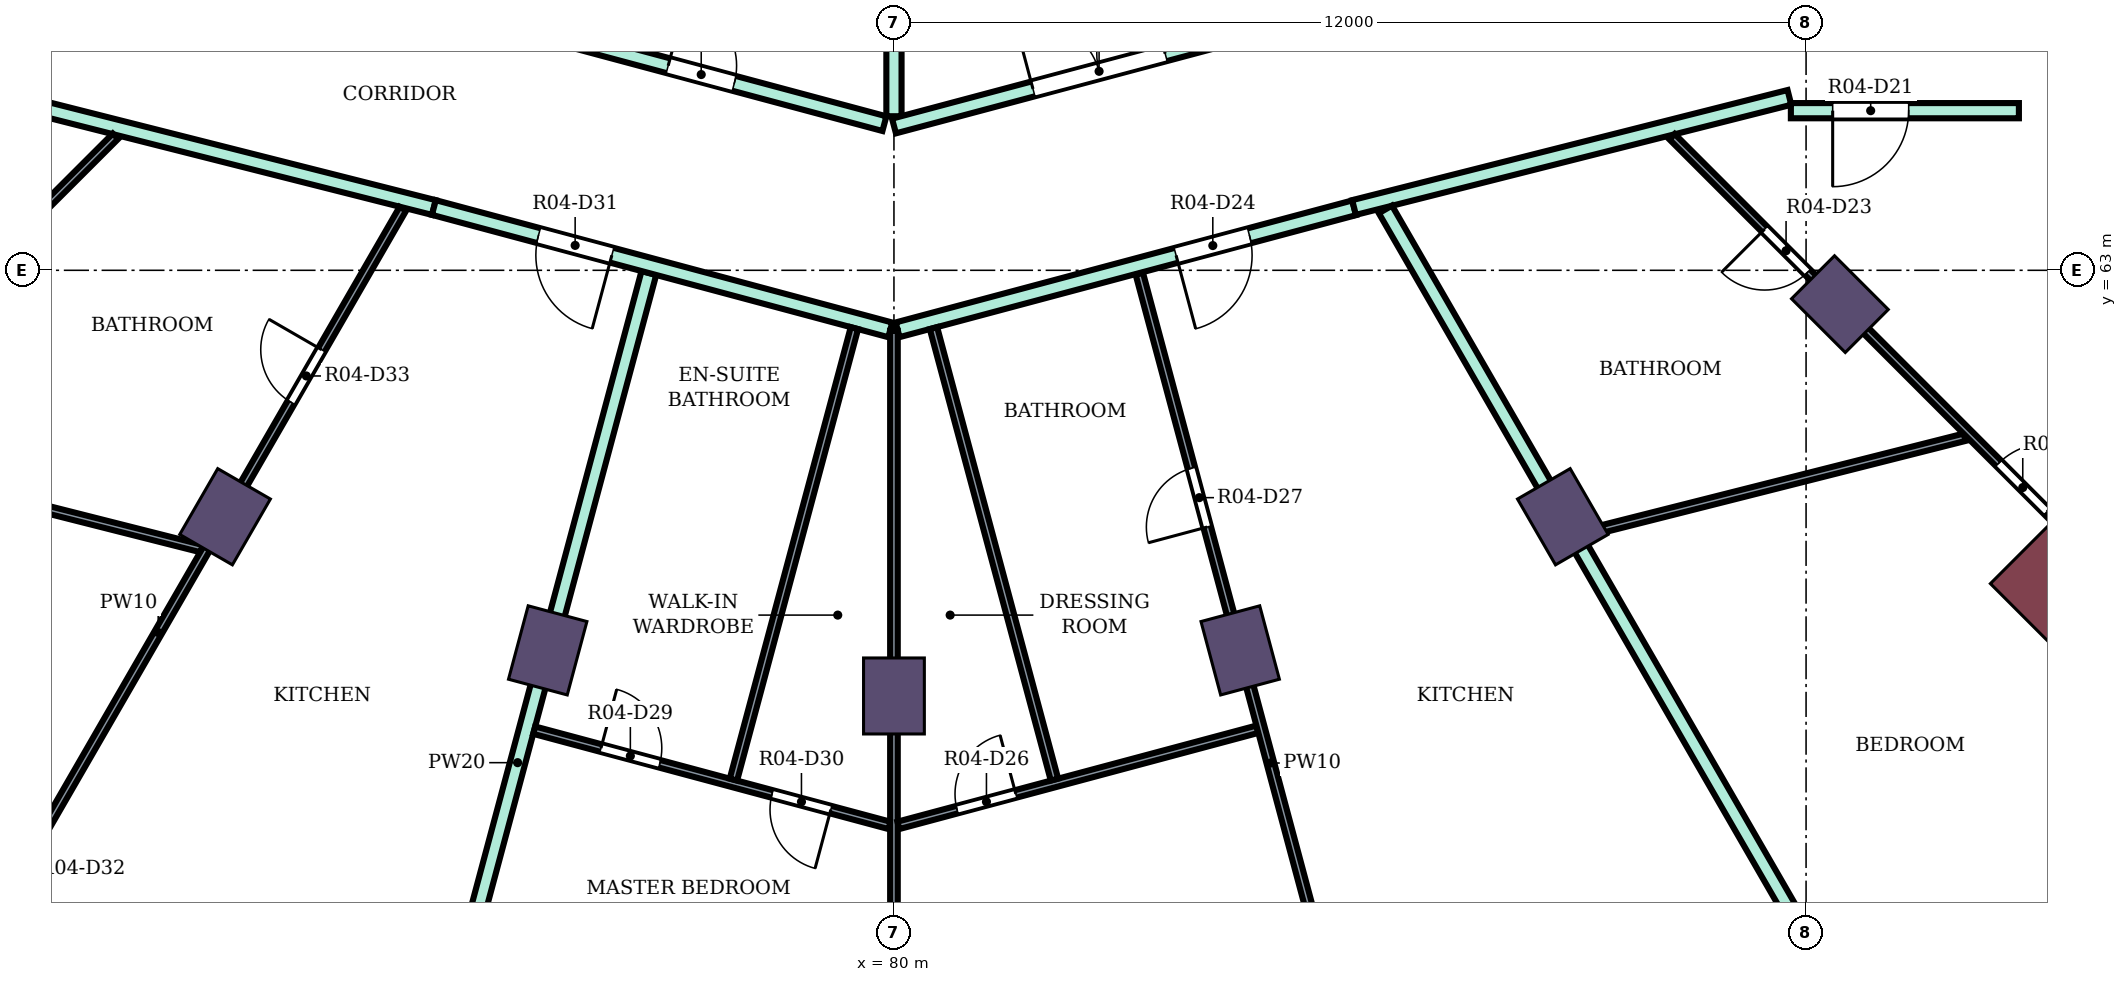
"""IFC4 building model, lengths in metres.
Left out: names, types, materials, properties, quantities, classifications, styles, units other than length and angle.
Written with IfcOpenShell. Run it as: python <this file> out.ifc"""

import sys

from ifc_helpers import new_model, si_unit, direction, frame, frame_2d, origin, origin_2d, place, context, subcontext, project, spatial, rectangle, extrude, element, fill, save


model = new_model("IFC4")
c1 = context("Model", 3, precision=1e-05, world=origin(), true_north=direction((0.0, 1.0)))
c2 = subcontext(c1, "Body", "Model", "MODEL_VIEW")
j1 = project(units=[si_unit("LENGTHUNIT", "METRE"), si_unit("PLANEANGLEUNIT", "RADIAN")], contexts=[c1])
p1 = place(None, origin())
s1 = spatial("IfcSite", under=j1, at=p1, CompositionType="ELEMENT")
p2 = place(p1, origin())
s2 = spatial("IfcBuilding", under=s1, at=p2, CompositionType="ELEMENT")
p3 = place(p2, frame((0.0, 0.0, 202.8)))
s3 = spatial("IfcBuildingStorey", under=s2, at=p3, CompositionType="ELEMENT", Elevation=202.8)
for number, where, z_axis, x_axis in (
    (1, (71.2, 59.758, 0.0), (0.0, 0.0, 1.0), (-0.5, -0.866, 0.0)),
    (2, (75.445, 58.0, 0.0), (0.0, 0.0, 1.0), (-0.259, -0.966, 0.0)),
    (3, (80.0, 57.4, 0.0), (0.0, 0.0, 1.0), (0.0, -1.0, 0.0)),
    (4, (84.555, 58.0, 0.0), (0.0, 0.0, 1.0), (0.259, -0.966, 0.0)),
    (5, (88.8, 59.758, 0.0), (0.0, 0.0, 1.0), (0.5, -0.866, 0.0)),
    (6, (92.445, 62.555, 0.0), (0.0, 0.0, 1.0), (0.707, -0.707, 0.0)),
):
    element("IfcColumn", number, at=place(p3, frame(where, z_axis=z_axis, x_axis=x_axis)), inside=s3, PredefinedType="COLUMN", context=c2, shape_type="SweptSolid", body=[
        extrude(rectangle(XDim=1.0, YDim=0.8, at=origin_2d()), origin(), (0.0, 0.0, 1.0), 4.1),
    ])
p4 = place(p3, frame((95.91, 59.09, 0.0), z_axis=(0.0, 0.0, 1.0), x_axis=(0.707106781187, -0.707106781187, 0.0)))
e7 = element("IfcColumn", 7, at=p4, inside=s3, PredefinedType="COLUMN", context=c2, shape_type="SweptSolid", body=[
    extrude(rectangle(XDim=1.8, YDim=2.4, at=origin_2d()), origin(), (0.0, 0.0, 1.0), 4.1),
])
p5 = place(p3, frame((68.2, 65.28, 0.0), z_axis=(0.0, 0.0, 1.0), x_axis=(0.969450596516, -0.245286650503, 0.0)))
e8 = element("IfcWall", 8, at=p5, inside=s3, PredefinedType="PARTITIONING", context=c2, shape_type="SweptSolid", body=[
    extrude(rectangle(XDim=5.928, YDim=0.2, at=frame_2d((2.964, 0.0))), origin(), (0.0, 0.0, 1.0), 3.65),
])
p6 = place(p3, frame((73.323, 50.081, 0.0), z_axis=(0.0, 0.0, 1.0), x_axis=(0.258888262922, 0.965907276772, 0.0)))
e9 = element("IfcWall", 9, at=p6, inside=s3, PredefinedType="PARTITIONING", context=c2, shape_type="SweptSolid", body=[
    extrude(rectangle(XDim=13.338, YDim=0.2, at=frame_2d((6.669, 0.0))), origin(), (0.0, 0.0, 1.0), 3.65),
])
p7 = place(p3, frame((73.947, 63.826, 0.0), z_axis=(0.0, 0.0, 1.0), x_axis=(0.965908253407, -0.258884619088, 0.0)))
e10 = element("IfcWall", 10, at=p7, inside=s3, PredefinedType="PARTITIONING", context=c2, shape_type="SweptSolid", body=[
    extrude(rectangle(XDim=6.217, YDim=0.2, at=frame_2d((3.108, 0.0))), origin(), (0.0, 0.0, 1.0), 3.65),
])
p8 = place(p7, frame((1.424, 0.0, 0.0)))
e11 = element("IfcOpeningElement", 11, at=p8, cuts=e10, PredefinedType="OPENING", context=c2, shape_type="SweptSolid", body=[
    extrude(rectangle(XDim=1.0, YDim=2.1, at=frame_2d((0.5, 1.05))), frame((0.0, 0.11, 0.0), z_axis=(0.0, -1.0, 0.0), x_axis=(1.0, 0.0, 0.0)), (0.0, 0.0, 1.0), 0.22),
])
p9 = place(p3, frame((74.603, 66.342, 0.0), z_axis=(0.0, 0.0, 1.0), x_axis=(0.965920893652, -0.258837453254, 0.0)))
e12 = element("IfcWall", 12, at=p9, inside=s3, PredefinedType="PARTITIONING", context=c2, shape_type="SweptSolid", body=[
    extrude(rectangle(XDim=5.458, YDim=0.2, at=frame_2d((2.729, 0.0))), origin(), (0.0, 0.0, 1.0), 3.65),
])
p10 = place(p9, frame((2.512, 0.0, 0.0)))
e13 = element("IfcOpeningElement", 13, at=p10, cuts=e12, PredefinedType="OPENING", context=c2, shape_type="SweptSolid", body=[
    extrude(rectangle(XDim=0.9, YDim=2.1, at=frame_2d((0.45, 1.05))), frame((0.0, 0.11, 0.0), z_axis=(0.0, -1.0, 0.0), x_axis=(1.0, 0.0, 0.0)), (0.0, 0.0, 1.0), 0.22),
])
p11 = place(p3, frame((80.048, 62.217, 0.0), z_axis=(0.0, 0.0, 1.0), x_axis=(0.966097920642, 0.258175923996, 0.0)))
e14 = element("IfcWall", 14, at=p11, inside=s3, PredefinedType="PARTITIONING", context=c2, shape_type="SweptSolid", body=[
    extrude(rectangle(XDim=6.217, YDim=0.2, at=frame_2d((3.108, 0.0))), origin(), (0.0, 0.0, 1.0), 3.65),
])
p12 = place(p11, frame((3.792, 0.0, 0.0)))
e15 = element("IfcOpeningElement", 15, at=p12, cuts=e14, PredefinedType="OPENING", context=c2, shape_type="SweptSolid", body=[
    extrude(rectangle(XDim=1.0, YDim=2.1, at=frame_2d((0.5, 1.05))), frame((0.0, 0.11, 0.0), z_axis=(0.0, -1.0, 0.0), x_axis=(1.0, 0.0, 0.0)), (0.0, 0.0, 1.0), 0.22),
])
p13 = place(p3, frame((80.0, 65.027, 0.0), z_axis=(0.0, 0.0, 1.0), x_axis=(0.0, 1.0, 0.0)))
e16 = element("IfcWall", 16, at=p13, inside=s3, PredefinedType="PARTITIONING", context=c2, shape_type="SweptSolid", body=[
    extrude(rectangle(XDim=2.273, YDim=0.2, at=frame_2d((1.136, 0.0))), origin(), (0.0, 0.0, 1.0), 3.65),
])
p14 = place(p3, frame((80.0, 64.898, 0.0), z_axis=(0.0, 0.0, 1.0), x_axis=(0.966236923997, 0.25765520896, 0.0)))
e17 = element("IfcWall", 17, at=p14, inside=s3, PredefinedType="PARTITIONING", context=c2, shape_type="SweptSolid", body=[
    extrude(rectangle(XDim=8.168, YDim=0.2, at=frame_2d((4.084, 0.0))), origin(), (0.0, 0.0, 1.0), 3.65),
])
p15 = place(p14, frame((1.893, 0.0, 0.0)))
e18 = element("IfcOpeningElement", 18, at=p15, cuts=e17, PredefinedType="OPENING", context=c2, shape_type="SweptSolid", body=[
    extrude(rectangle(XDim=1.8, YDim=2.1, at=frame_2d((0.9, 1.05))), frame((0.0, 0.11, 0.0), z_axis=(0.0, -1.0, 0.0), x_axis=(1.0, 0.0, 0.0)), (0.0, 0.0, 1.0), 0.22),
])
p16 = place(p3, frame((86.053, 63.826, 0.0), z_axis=(0.0, 0.0, 1.0), x_axis=(0.969490004987, 0.245130843083, 0.0)))
e19 = element("IfcWall", 19, at=p16, inside=s3, PredefinedType="PARTITIONING", context=c2, shape_type="SweptSolid", body=[
    extrude(rectangle(XDim=5.908, YDim=0.2, at=frame_2d((2.954, 0.0))), origin(), (0.0, 0.0, 1.0), 3.65),
])
p17 = place(p3, frame((86.466, 63.801, 0.0), z_axis=(0.0, 0.0, 1.0), x_axis=(0.499937082171, -0.866061726362, 0.0)))
e20 = element("IfcWall", 20, at=p17, inside=s3, PredefinedType="PARTITIONING", context=c2, shape_type="SweptSolid", body=[
    extrude(rectangle(XDim=12.866, YDim=0.2, at=frame_2d((6.433, 0.0))), origin(), (0.0, 0.0, 1.0), 3.65),
])
p18 = place(p3, frame((91.8, 65.1, 0.0), z_axis=(0.0, 0.0, 1.0), x_axis=(1.0, 0.0, 0.0)))
e21 = element("IfcWall", 21, at=p18, inside=s3, PredefinedType="PARTITIONING", context=c2, shape_type="SweptSolid", body=[
    extrude(rectangle(XDim=3.0, YDim=0.2, at=frame_2d((1.5, 0.0))), origin(), (0.0, 0.0, 1.0), 3.65),
])
p19 = place(p18, frame((0.55, 0.0, 0.0)))
e22 = element("IfcOpeningElement", 22, at=p19, cuts=e21, PredefinedType="OPENING", context=c2, shape_type="SweptSolid", body=[
    extrude(rectangle(XDim=1.0, YDim=2.1, at=frame_2d((0.5, 1.05))), frame((0.0, 0.11, 0.0), z_axis=(0.0, -1.0, 0.0), x_axis=(1.0, 0.0, 0.0)), (0.0, 0.0, 1.0), 0.22),
])
p20 = place(p3, frame((63.592, 58.6, 0.0), z_axis=(0.0, 0.0, 1.0), x_axis=(0.707260766325, 0.706952762508, 0.0)))
e23 = element("IfcWall", 23, at=p20, inside=s3, PredefinedType="PARTITIONING", context=c2, shape_type="SweptSolid", body=[
    extrude(rectangle(XDim=8.719, YDim=0.1, at=frame_2d((4.36, 0.0))), origin(), (0.0, 0.0, 1.0), 3.65),
])
p21 = place(p20, frame((1.772, 0.0, 0.0)))
e24 = element("IfcOpeningElement", 24, at=p21, cuts=e23, PredefinedType="OPENING", context=c2, shape_type="SweptSolid", body=[
    extrude(rectangle(XDim=0.9, YDim=2.1, at=frame_2d((0.45, 1.05))), frame((0.0, 0.06, 0.0), z_axis=(0.0, -1.0, 0.0), x_axis=(1.0, 0.0, 0.0)), (0.0, 0.0, 1.0), 0.12),
])
p22 = place(p3, frame((65.74, 60.642, 0.0), z_axis=(0.0, 0.0, 1.0), x_axis=(0.969435742918, -0.245345349156, 0.0)))
e25 = element("IfcWall", 25, at=p22, inside=s3, PredefinedType="PARTITIONING", context=c2, shape_type="SweptSolid", body=[
    extrude(rectangle(XDim=5.314, YDim=0.1, at=frame_2d((2.657, 0.0))), origin(), (0.0, 0.0, 1.0), 3.65),
])
p23 = place(p3, frame((67.101, 52.659, 0.0), z_axis=(0.0, 0.0, 1.0), x_axis=(0.500035926033, 0.866004660886, 0.0)))
e26 = element("IfcWall", 26, at=p23, inside=s3, PredefinedType="PARTITIONING", context=c2, shape_type="SweptSolid", body=[
    extrude(rectangle(XDim=12.876, YDim=0.1, at=frame_2d((6.438, 0.0))), origin(), (0.0, 0.0, 1.0), 3.65),
])
p24 = place(p23, frame((2.401, 0.0, 0.0)))
e27 = element("IfcOpeningElement", 27, at=p24, cuts=e26, PredefinedType="OPENING", context=c2, shape_type="SweptSolid", body=[
    extrude(rectangle(XDim=0.9, YDim=2.1, at=frame_2d((0.45, 1.05))), frame((0.0, 0.06, 0.0), z_axis=(0.0, -1.0, 0.0), x_axis=(1.0, 0.0, 0.0)), (0.0, 0.0, 1.0), 0.12),
])
p25 = place(p23, frame((9.936, 0.0, 0.0)))
e28 = element("IfcOpeningElement", 28, at=p25, cuts=e26, PredefinedType="OPENING", context=c2, shape_type="SweptSolid", body=[
    extrude(rectangle(XDim=0.8, YDim=2.1, at=frame_2d((0.4, 1.05))), frame((0.0, 0.06, 0.0), z_axis=(0.0, -1.0, 0.0), x_axis=(1.0, 0.0, 0.0)), (0.0, 0.0, 1.0), 0.12),
])
p26 = place(p3, frame((75.267, 56.95, 0.0), z_axis=(0.0, 0.0, 1.0), x_axis=(0.965900084933, -0.25891509405, 0.0)))
e29 = element("IfcWall", 29, at=p26, inside=s3, PredefinedType="PARTITIONING", context=c2, shape_type="SweptSolid", body=[
    extrude(rectangle(XDim=4.84, YDim=0.1, at=frame_2d((2.42, 0.0))), origin(), (0.0, 0.0, 1.0), 3.65),
])
p27 = place(p26, frame((0.91, 0.0, 0.0)))
e30 = element("IfcOpeningElement", 30, at=p27, cuts=e29, PredefinedType="OPENING", context=c2, shape_type="SweptSolid", body=[
    extrude(rectangle(XDim=0.8, YDim=2.1, at=frame_2d((0.4, 1.05))), frame((0.0, 0.06, 0.0), z_axis=(0.0, -1.0, 0.0), x_axis=(1.0, 0.0, 0.0)), (0.0, 0.0, 1.0), 0.12),
])
p28 = place(p26, frame((3.24, 0.0, 0.0)))
e31 = element("IfcOpeningElement", 31, at=p28, cuts=e29, PredefinedType="OPENING", context=c2, shape_type="SweptSolid", body=[
    extrude(rectangle(XDim=0.8, YDim=2.1, at=frame_2d((0.4, 1.05))), frame((0.0, 0.06, 0.0), z_axis=(0.0, -1.0, 0.0), x_axis=(1.0, 0.0, 0.0)), (0.0, 0.0, 1.0), 0.12),
])
p29 = place(p3, frame((77.888, 56.3, 0.0), z_axis=(0.0, 0.0, 1.0), x_axis=(0.258885575383, 0.965907997098, 0.0)))
e32 = element("IfcWall", 32, at=p29, inside=s3, PredefinedType="PARTITIONING", context=c2, shape_type="SweptSolid", body=[
    extrude(rectangle(XDim=6.15, YDim=0.1, at=frame_2d((3.075, 0.0))), origin(), (0.0, 0.0, 1.0), 3.65),
])
p30 = place(p3, frame((80.0, 51.8, 0.0), z_axis=(0.0, 0.0, 1.0), x_axis=(0.0, 1.0, 0.0)))
e33 = element("IfcWall", 33, at=p30, inside=s3, PredefinedType="PARTITIONING", context=c2, shape_type="SweptSolid", body=[
    extrude(rectangle(XDim=10.404, YDim=0.1, at=frame_2d((5.202, 0.0))), origin(), (0.0, 0.0, 1.0), 3.65),
])
p31 = place(p30, frame((1.666, 0.0, 0.0)))
e34 = element("IfcOpeningElement", 34, at=p31, cuts=e33, PredefinedType="OPENING", context=c2, shape_type="SweptSolid", body=[
    extrude(rectangle(XDim=0.9, YDim=2.1, at=frame_2d((0.45, 1.05))), frame((0.0, 0.06, 0.0), z_axis=(0.0, -1.0, 0.0), x_axis=(1.0, 0.0, 0.0)), (0.0, 0.0, 1.0), 0.12),
])
p32 = place(p3, frame((80.058, 55.698, 0.0), z_axis=(0.0, 0.0, 1.0), x_axis=(0.965970105839, 0.258653734992, 0.0)))
e35 = element("IfcWall", 35, at=p32, inside=s3, PredefinedType="PARTITIONING", context=c2, shape_type="SweptSolid", body=[
    extrude(rectangle(XDim=4.89, YDim=0.1, at=frame_2d((2.445, 0.0))), origin(), (0.0, 0.0, 1.0), 3.65),
])
p33 = place(p32, frame((0.8, 0.0, 0.0)))
e36 = element("IfcOpeningElement", 36, at=p33, cuts=e35, PredefinedType="OPENING", context=c2, shape_type="SweptSolid", body=[
    extrude(rectangle(XDim=0.8, YDim=2.1, at=frame_2d((0.4, 1.05))), frame((0.0, 0.06, 0.0), z_axis=(0.0, -1.0, 0.0), x_axis=(1.0, 0.0, 0.0)), (0.0, 0.0, 1.0), 0.12),
])
p34 = place(p3, frame((80.52, 62.24, 0.0), z_axis=(0.0, 0.0, 1.0), x_axis=(0.258885575383, -0.965907997098, 0.0)))
e37 = element("IfcWall", 37, at=p34, inside=s3, PredefinedType="PARTITIONING", context=c2, shape_type="SweptSolid", body=[
    extrude(rectangle(XDim=6.15, YDim=0.1, at=frame_2d((3.075, 0.0))), origin(), (0.0, 0.0, 1.0), 3.65),
])
p35 = place(p3, frame((83.228, 62.955, 0.0), z_axis=(0.0, 0.0, 1.0), x_axis=(0.258737611245, -0.965947642746, 0.0)))
e38 = element("IfcWall", 38, at=p35, inside=s3, PredefinedType="PARTITIONING", context=c2, shape_type="SweptSolid", body=[
    extrude(rectangle(XDim=13.328, YDim=0.1, at=frame_2d((6.664, 0.0))), origin(), (0.0, 0.0, 1.0), 3.65),
])
p36 = place(p35, frame((9.684, 0.0, 0.0)))
e39 = element("IfcOpeningElement", 39, at=p36, cuts=e38, PredefinedType="OPENING", context=c2, shape_type="SweptSolid", body=[
    extrude(rectangle(XDim=0.9, YDim=2.1, at=frame_2d((0.45, 1.05))), frame((0.0, 0.06, 0.0), z_axis=(0.0, -1.0, 0.0), x_axis=(1.0, 0.0, 0.0)), (0.0, 0.0, 1.0), 0.12),
])
p37 = place(p35, frame((2.65, 0.0, 0.0)))
e40 = element("IfcOpeningElement", 40, at=p37, cuts=e38, PredefinedType="OPENING", context=c2, shape_type="SweptSolid", body=[
    extrude(rectangle(XDim=0.8, YDim=2.1, at=frame_2d((0.4, 1.05))), frame((0.0, 0.06, 0.0), z_axis=(0.0, -1.0, 0.0), x_axis=(1.0, 0.0, 0.0)), (0.0, 0.0, 1.0), 0.12),
])
p38 = place(p3, frame((89.054, 59.531, 0.0), z_axis=(0.0, 0.0, 1.0), x_axis=(0.969472150829, 0.245201445279, 0.0)))
e41 = element("IfcWall", 41, at=p38, inside=s3, PredefinedType="PARTITIONING", context=c2, shape_type="SweptSolid", body=[
    extrude(rectangle(XDim=5.191, YDim=0.1, at=frame_2d((2.596, 0.0))), origin(), (0.0, 0.0, 1.0), 3.65),
])
p39 = place(p3, frame((90.236, 64.758, 0.0), z_axis=(0.0, 0.0, 1.0), x_axis=(0.706952774706, -0.707260754132, 0.0)))
e42 = element("IfcWall", 42, at=p39, inside=s3, PredefinedType="PARTITIONING", context=c2, shape_type="SweptSolid", body=[
    extrude(rectangle(XDim=8.72, YDim=0.1, at=frame_2d((4.36, 0.0))), origin(), (0.0, 0.0, 1.0), 3.65),
])
p40 = place(p39, frame((6.077, 0.0, 0.0)))
e43 = element("IfcOpeningElement", 43, at=p40, cuts=e42, PredefinedType="OPENING", context=c2, shape_type="SweptSolid", body=[
    extrude(rectangle(XDim=0.9, YDim=2.1, at=frame_2d((0.45, 1.05))), frame((0.0, 0.06, 0.0), z_axis=(0.0, -1.0, 0.0), x_axis=(1.0, 0.0, 0.0)), (0.0, 0.0, 1.0), 0.12),
])
p41 = place(p39, frame((1.722, 0.0, 0.0)))
e44 = element("IfcOpeningElement", 44, at=p41, cuts=e42, PredefinedType="OPENING", context=c2, shape_type="SweptSolid", body=[
    extrude(rectangle(XDim=0.8, YDim=2.1, at=frame_2d((0.4, 1.05))), frame((0.0, 0.06, 0.0), z_axis=(0.0, -1.0, 0.0), x_axis=(1.0, 0.0, 0.0)), (0.0, 0.0, 1.0), 0.12),
])
p42 = place(p19, frame((1.0, 0.0, 0.0), z_axis=(0.0, 0.0, 1.0), x_axis=(-1.0, 0.0, 0.0)))
e45 = element("IfcDoor", 45, at=p42, inside=s3, OperationType="SINGLE_SWING_RIGHT", PredefinedType="DOOR", context=c2, shape_type="SweptSolid", body=[
    extrude(rectangle(XDim=1.0, YDim=2.1, at=frame_2d((0.5, 1.05))), frame((0.0, 0.025, 0.0), z_axis=(0.0, -1.0, 0.0), x_axis=(1.0, 0.0, 0.0)), (0.0, 0.0, 1.0), 0.05),
])
fill(e22, e45)
p43 = place(p40, origin())
e46 = element("IfcDoor", 46, at=p43, inside=s3, OperationType="SINGLE_SWING_RIGHT", PredefinedType="DOOR", context=c2, shape_type="SweptSolid", body=[
    extrude(rectangle(XDim=0.9, YDim=2.1, at=frame_2d((0.45, 1.05))), frame((0.0, 0.025, 0.0), z_axis=(0.0, -1.0, 0.0), x_axis=(1.0, 0.0, 0.0)), (0.0, 0.0, 1.0), 0.05),
])
fill(e43, e46)
p44 = place(p41, frame((0.8, 0.0, 0.0), z_axis=(0.0, 0.0, 1.0), x_axis=(-1.0, 0.0, 0.0)))
e47 = element("IfcDoor", 47, at=p44, inside=s3, OperationType="SINGLE_SWING_RIGHT", PredefinedType="DOOR", context=c2, shape_type="SweptSolid", body=[
    extrude(rectangle(XDim=0.8, YDim=2.1, at=frame_2d((0.4, 1.05))), frame((0.0, 0.025, 0.0), z_axis=(0.0, -1.0, 0.0), x_axis=(1.0, 0.0, 0.0)), (0.0, 0.0, 1.0), 0.05),
])
fill(e44, e47)
p45 = place(p12, frame((1.0, 0.0, 0.0), z_axis=(0.0, 0.0, 1.0), x_axis=(-1.0, 0.0, 0.0)))
e48 = element("IfcDoor", 48, at=p45, inside=s3, OperationType="SINGLE_SWING_RIGHT", PredefinedType="DOOR", context=c2, shape_type="SweptSolid", body=[
    extrude(rectangle(XDim=1.0, YDim=2.1, at=frame_2d((0.5, 1.05))), frame((0.0, 0.025, 0.0), z_axis=(0.0, -1.0, 0.0), x_axis=(1.0, 0.0, 0.0)), (0.0, 0.0, 1.0), 0.05),
])
fill(e15, e48)
p46 = place(p33, origin())
e49 = element("IfcDoor", 49, at=p46, inside=s3, OperationType="SINGLE_SWING_RIGHT", PredefinedType="DOOR", context=c2, shape_type="SweptSolid", body=[
    extrude(rectangle(XDim=0.8, YDim=2.1, at=frame_2d((0.4, 1.05))), frame((0.0, 0.025, 0.0), z_axis=(0.0, -1.0, 0.0), x_axis=(1.0, 0.0, 0.0)), (0.0, 0.0, 1.0), 0.05),
])
fill(e36, e49)
p47 = place(p37, frame((0.8, 0.0, 0.0), z_axis=(0.0, 0.0, 1.0), x_axis=(-1.0, 0.0, 0.0)))
e50 = element("IfcDoor", 50, at=p47, inside=s3, OperationType="SINGLE_SWING_LEFT", PredefinedType="DOOR", context=c2, shape_type="SweptSolid", body=[
    extrude(rectangle(XDim=0.8, YDim=2.1, at=frame_2d((0.4, 1.05))), frame((0.0, 0.025, 0.0), z_axis=(0.0, -1.0, 0.0), x_axis=(1.0, 0.0, 0.0)), (0.0, 0.0, 1.0), 0.05),
])
fill(e40, e50)
p48 = place(p27, origin())
e51 = element("IfcDoor", 51, at=p48, inside=s3, OperationType="SINGLE_SWING_LEFT", PredefinedType="DOOR", context=c2, shape_type="SweptSolid", body=[
    extrude(rectangle(XDim=0.8, YDim=2.1, at=frame_2d((0.4, 1.05))), frame((0.0, 0.025, 0.0), z_axis=(0.0, -1.0, 0.0), x_axis=(1.0, 0.0, 0.0)), (0.0, 0.0, 1.0), 0.05),
])
fill(e30, e51)
p49 = place(p28, frame((0.8, 0.0, 0.0), z_axis=(0.0, 0.0, 1.0), x_axis=(-1.0, 0.0, 0.0)))
e52 = element("IfcDoor", 52, at=p49, inside=s3, OperationType="SINGLE_SWING_LEFT", PredefinedType="DOOR", context=c2, shape_type="SweptSolid", body=[
    extrude(rectangle(XDim=0.8, YDim=2.1, at=frame_2d((0.4, 1.05))), frame((0.0, 0.025, 0.0), z_axis=(0.0, -1.0, 0.0), x_axis=(1.0, 0.0, 0.0)), (0.0, 0.0, 1.0), 0.05),
])
fill(e31, e52)
p50 = place(p8, frame((1.0, 0.0, 0.0), z_axis=(0.0, 0.0, 1.0), x_axis=(-1.0, 0.0, 0.0)))
e53 = element("IfcDoor", 53, at=p50, inside=s3, OperationType="SINGLE_SWING_LEFT", PredefinedType="DOOR", context=c2, shape_type="SweptSolid", body=[
    extrude(rectangle(XDim=1.0, YDim=2.1, at=frame_2d((0.5, 1.05))), frame((0.0, 0.025, 0.0), z_axis=(0.0, -1.0, 0.0), x_axis=(1.0, 0.0, 0.0)), (0.0, 0.0, 1.0), 0.05),
])
fill(e11, e53)
p51 = place(p25, origin())
e54 = element("IfcDoor", 54, at=p51, inside=s3, OperationType="SINGLE_SWING_RIGHT", PredefinedType="DOOR", context=c2, shape_type="SweptSolid", body=[
    extrude(rectangle(XDim=0.8, YDim=2.1, at=frame_2d((0.4, 1.05))), frame((0.0, 0.025, 0.0), z_axis=(0.0, -1.0, 0.0), x_axis=(1.0, 0.0, 0.0)), (0.0, 0.0, 1.0), 0.05),
])
fill(e28, e54)
p52 = place(p15, origin())
e55 = element("IfcDoor", 55, at=p52, inside=s3, OperationType="DOUBLE_DOOR_SINGLE_SWING", PredefinedType="DOOR", context=c2, shape_type="SweptSolid", body=[
    extrude(rectangle(XDim=1.8, YDim=2.1, at=frame_2d((0.9, 1.05))), frame((0.0, 0.025, 0.0), z_axis=(0.0, -1.0, 0.0), x_axis=(1.0, 0.0, 0.0)), (0.0, 0.0, 1.0), 0.05),
])
fill(e18, e55)
p53 = place(p10, origin())
e56 = element("IfcDoor", 56, at=p53, inside=s3, OperationType="SINGLE_SWING_LEFT", PredefinedType="DOOR", context=c2, shape_type="SweptSolid", body=[
    extrude(rectangle(XDim=0.9, YDim=2.1, at=frame_2d((0.45, 1.05))), frame((0.0, 0.025, 0.0), z_axis=(0.0, -1.0, 0.0), x_axis=(1.0, 0.0, 0.0)), (0.0, 0.0, 1.0), 0.05),
])
fill(e13, e56)
save(model, sys.argv[1])
